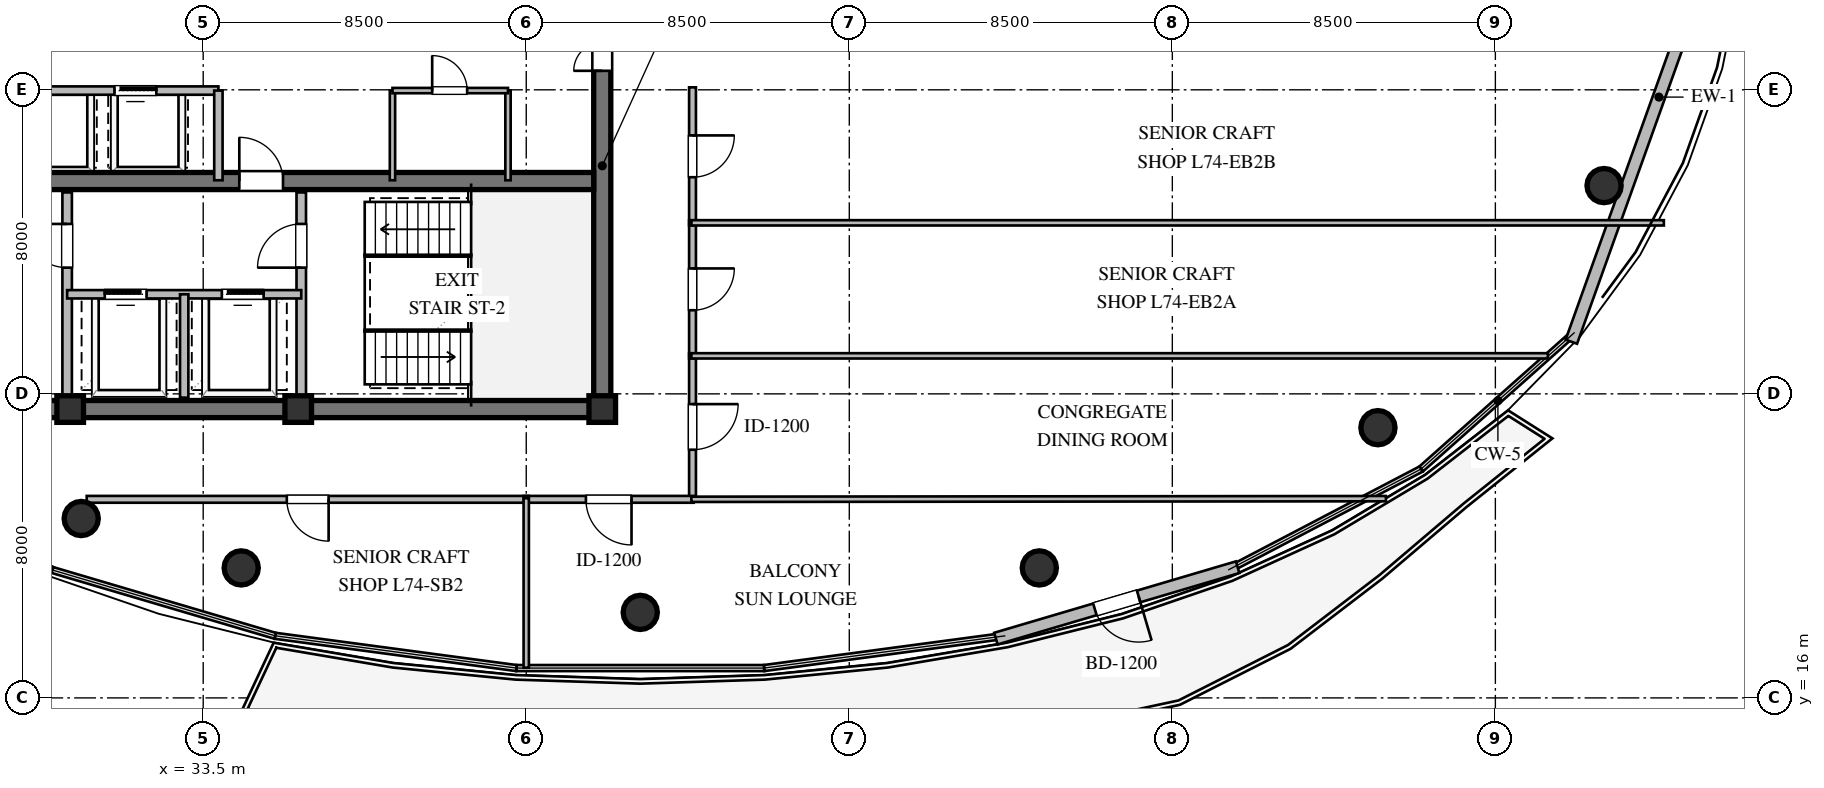
"""IFC4 building model, lengths in metres.
Left out: names, types, materials, properties, quantities, classifications, styles, units other than length and angle.
Written with IfcOpenShell. Run it as: python <this file> out.ifc"""

import sys

from ifc_helpers import new_model, si_unit, direction, frame, frame_2d, origin, origin_2d, place, context, subcontext, project, spatial, rectangle, circle, extrude, element, fill, save


model = new_model("IFC4")
c1 = context("Model", 3, precision=1e-05, world=origin(), true_north=direction((0.0, 1.0)))
c2 = subcontext(c1, "Body", "Model", "MODEL_VIEW")
j1 = project(units=[si_unit("LENGTHUNIT", "METRE"), si_unit("PLANEANGLEUNIT", "RADIAN")], contexts=[c1])
p1 = place(None, origin())
s1 = spatial("IfcSite", under=j1, at=p1, CompositionType="ELEMENT")
p2 = place(p1, origin())
s2 = spatial("IfcBuilding", under=s1, at=p2, CompositionType="ELEMENT")
p3 = place(p2, frame((0.0, 0.0, 281.4)))
s3 = spatial("IfcBuildingStorey", under=s2, at=p3, CompositionType="ELEMENT", Elevation=281.4)
p4 = place(p3, frame((21.775, 23.6, 0.0), z_axis=(0.0, 0.0, 1.0), x_axis=(1.0, 0.0, 0.0)))
e1 = element("IfcWall", 1, at=p4, inside=s3, PredefinedType="SHEAR", context=c2, shape_type="SweptSolid", body=[
    extrude(rectangle(XDim=22.45, YDim=0.45, at=frame_2d((11.225, 0.0))), origin(), (0.0, 0.0, 1.0), 3.56),
])
p5 = place(p3, frame((44.0, 23.825, 0.0), z_axis=(0.0, 0.0, 1.0), x_axis=(0.0, 1.0, 0.0)))
e2 = element("IfcWall", 2, at=p5, inside=s3, PredefinedType="SHEAR", context=c2, shape_type="SweptSolid", body=[
    extrude(rectangle(XDim=12.35, YDim=0.45, at=frame_2d((6.175, 0.0))), origin(), (0.0, 0.0, 1.0), 3.56),
])
p6 = place(p5, frame((8.675, 0.0, 0.0)))
e3 = element("IfcOpeningElement", 3, at=p6, cuts=e2, PredefinedType="OPENING", context=c2, shape_type="SweptSolid", body=[
    extrude(rectangle(XDim=1.5, YDim=2.15, at=frame_2d((0.75, 1.075))), frame((0.0, 0.235, 0.0), z_axis=(0.0, -1.0, 0.0), x_axis=(1.0, 0.0, 0.0)), (0.0, 0.0, 1.0), 0.47),
])
p7 = place(p3, frame((22.225, 29.6, 0.0), z_axis=(0.0, 0.0, 1.0), x_axis=(1.0, 0.0, 0.0)))
e4 = element("IfcWall", 4, at=p7, inside=s3, PredefinedType="SHEAR", context=c2, shape_type="SweptSolid", body=[
    extrude(rectangle(XDim=21.55, YDim=0.45, at=frame_2d((10.775, 0.0))), origin(), (0.0, 0.0, 1.0), 3.56),
])
p8 = place(p7, frame((12.225, 0.0, 0.0)))
e5 = element("IfcOpeningElement", 5, at=p8, cuts=e4, PredefinedType="OPENING", context=c2, shape_type="SweptSolid", body=[
    extrude(rectangle(XDim=1.15, YDim=2.1, at=frame_2d((0.575, 1.05))), frame((0.0, 0.235, 0.0), z_axis=(0.0, -1.0, 0.0), x_axis=(1.0, 0.0, 0.0)), (0.0, 0.0, 1.0), 0.47),
])
for number, where, z_axis, x_axis in (
    (6, (30.0, 23.6, 0.0), (0.0, 0.0, 1.0), (1.0, 0.0, 0.0)),
    (7, (36.0, 23.6, 0.0), (0.0, 0.0, 1.0), (1.0, 0.0, 0.0)),
    (8, (44.0, 23.6, 0.0), (0.0, 0.0, 1.0), (1.0, 0.0, 0.0)),
):
    element("IfcColumn", number, at=place(p3, frame(where, z_axis=z_axis, x_axis=x_axis)), inside=s3, PredefinedType="COLUMN", context=c2, shape_type="SweptSolid", body=[
        extrude(rectangle(XDim=0.7, YDim=0.7, at=origin_2d()), origin(), (0.0, 0.0, 1.0), 3.8),
    ])
for number, where, z_axis, x_axis in (
    (9, (30.29, 20.72, 0.0), (0.0, 0.0, 1.0), (1.0, 0.0, 0.0)),
    (10, (34.5, 19.42, 0.0), (0.0, 0.0, 1.0), (1.0, 0.0, 0.0)),
    (11, (45.0, 18.25, 0.0), (0.0, 0.0, 1.0), (1.0, 0.0, 0.0)),
    (12, (55.5, 19.42, 0.0), (0.0, 0.0, 1.0), (1.0, 0.0, 0.0)),
    (13, (64.41, 23.11, 0.0), (0.0, 0.0, 1.0), (1.0, 0.0, 0.0)),
    (14, (70.36, 29.48, 0.0), (0.0, 0.0, 1.0), (1.0, 0.0, 0.0)),
):
    element("IfcColumn", number, at=place(p3, frame(where, z_axis=z_axis, x_axis=x_axis)), inside=s3, PredefinedType="COLUMN", context=c2, shape_type="SweptSolid", body=[
        extrude(circle(Radius=0.45, at=origin_2d()), origin(), (0.0, 0.0, 1.0), 3.8),
    ])
p9 = place(p3, frame((74.108, 38.245, 0.0), z_axis=(0.0, 0.0, 1.0), x_axis=(-0.337073777429, -0.941478235845, 0.0)))
e15 = element("IfcWall", 15, at=p9, inside=s3, PredefinedType="STANDARD", context=c2, shape_type="SweptSolid", body=[
    extrude(rectangle(XDim=13.673, YDim=0.32, at=frame_2d((6.837, 0.0))), origin(), (0.0, 0.0, 1.0), 3.56),
])
p10 = place(p3, frame((60.718, 19.439, 0.0), z_axis=(0.0, 0.0, 1.0), x_axis=(-0.959026574291, -0.283316130503, 0.0)))
e16 = element("IfcWall", 16, at=p10, inside=s3, PredefinedType="STANDARD", context=c2, shape_type="SweptSolid", body=[
    extrude(rectangle(XDim=6.632, YDim=0.32, at=frame_2d((3.316, 0.0))), origin(), (0.0, 0.0, 1.0), 3.56),
])
p11 = place(p10, frame((2.716, 0.0, 0.0)))
e17 = element("IfcOpeningElement", 17, at=p11, cuts=e16, PredefinedType="OPENING", context=c2, shape_type="SweptSolid", body=[
    extrude(rectangle(XDim=1.2, YDim=2.15, at=frame_2d((0.6, 1.075))), frame((0.0, 0.17, 0.0), z_axis=(0.0, -1.0, 0.0), x_axis=(1.0, 0.0, 0.0)), (0.0, 0.0, 1.0), 0.34),
])
p12 = place(p3, frame((29.92, 23.9, 0.0), z_axis=(0.0, 0.0, 1.0), x_axis=(0.0, 1.0, 0.0)))
e18 = element("IfcWall", 18, at=p12, inside=s3, PredefinedType="SOLIDWALL", context=c2, shape_type="SweptSolid", body=[
    extrude(rectangle(XDim=5.4, YDim=0.25, at=frame_2d((2.7, 0.0))), origin(), (0.0, 0.0, 1.0), 3.006),
])
p13 = place(p12, frame((3.421, 0.0, 0.0)))
e19 = element("IfcOpeningElement", 19, at=p13, cuts=e18, PredefinedType="OPENING", context=c2, shape_type="SweptSolid", body=[
    extrude(rectangle(XDim=1.15, YDim=2.1, at=frame_2d((0.575, 1.05))), frame((0.0, 0.135, 0.0), z_axis=(0.0, -1.0, 0.0), x_axis=(1.0, 0.0, 0.0)), (0.0, 0.0, 1.0), 0.27),
])
p14 = place(p3, frame((36.08, 23.9, 0.0), z_axis=(0.0, 0.0, 1.0), x_axis=(0.0, 1.0, 0.0)))
e20 = element("IfcWall", 20, at=p14, inside=s3, PredefinedType="SOLIDWALL", context=c2, shape_type="SweptSolid", body=[
    extrude(rectangle(XDim=5.4, YDim=0.25, at=frame_2d((2.7, 0.0))), origin(), (0.0, 0.0, 1.0), 3.56),
])
p15 = place(p14, frame((3.421, 0.0, 0.0)))
e21 = element("IfcOpeningElement", 21, at=p15, cuts=e20, PredefinedType="OPENING", context=c2, shape_type="SweptSolid", body=[
    extrude(rectangle(XDim=1.15, YDim=2.1, at=frame_2d((0.575, 1.05))), frame((0.0, 0.135, 0.0), z_axis=(0.0, -1.0, 0.0), x_axis=(1.0, 0.0, 0.0)), (0.0, 0.0, 1.0), 0.27),
])
p16 = place(p3, frame((29.92, 26.62, 0.0), z_axis=(0.0, 0.0, 1.0), x_axis=(1.0, 0.0, 0.0)))
e22 = element("IfcWall", 22, at=p16, inside=s3, PredefinedType="SOLIDWALL", context=c2, shape_type="SweptSolid", body=[
    extrude(rectangle(XDim=6.16, YDim=0.22, at=frame_2d((3.08, 0.0))), origin(), (0.0, 0.0, 1.0), 3.56),
])
p17 = place(p16, frame((0.99, 0.0, 0.0)))
e23 = element("IfcOpeningElement", 23, at=p17, cuts=e22, PredefinedType="OPENING", context=c2, shape_type="SweptSolid", body=[
    extrude(rectangle(XDim=1.1, YDim=2.1, at=frame_2d((0.55, 1.05))), frame((0.0, 0.12, 0.0), z_axis=(0.0, -1.0, 0.0), x_axis=(1.0, 0.0, 0.0)), (0.0, 0.0, 1.0), 0.24),
])
p18 = place(p16, frame((4.07, 0.0, 0.0)))
e24 = element("IfcOpeningElement", 24, at=p18, cuts=e22, PredefinedType="OPENING", context=c2, shape_type="SweptSolid", body=[
    extrude(rectangle(XDim=1.1, YDim=2.1, at=frame_2d((0.55, 1.05))), frame((0.0, 0.12, 0.0), z_axis=(0.0, -1.0, 0.0), x_axis=(1.0, 0.0, 0.0)), (0.0, 0.0, 1.0), 0.24),
])
p19 = place(p3, frame((33.0, 23.9, 0.0), z_axis=(0.0, 0.0, 1.0), x_axis=(0.0, 1.0, 0.0)))
e25 = element("IfcWall", 25, at=p19, inside=s3, PredefinedType="SOLIDWALL", context=c2, shape_type="SweptSolid", body=[
    extrude(rectangle(XDim=2.72, YDim=0.22, at=frame_2d((1.36, 0.0))), origin(), (0.0, 0.0, 1.0), 3.56),
])
p20 = place(p3, frame((26.1, 31.98, 0.0), z_axis=(0.0, 0.0, 1.0), x_axis=(1.0, 0.0, 0.0)))
e26 = element("IfcWall", 26, at=p20, inside=s3, PredefinedType="SOLIDWALL", context=c2, shape_type="SweptSolid", body=[
    extrude(rectangle(XDim=7.8, YDim=0.22, at=frame_2d((3.9, 0.0))), origin(), (0.0, 0.0, 1.0), 3.56),
])
p21 = place(p20, frame((1.4, 0.0, 0.0)))
e27 = element("IfcOpeningElement", 27, at=p21, cuts=e26, PredefinedType="OPENING", context=c2, shape_type="SweptSolid", body=[
    extrude(rectangle(XDim=1.1, YDim=2.1, at=frame_2d((0.55, 1.05))), frame((0.0, 0.12, 0.0), z_axis=(0.0, -1.0, 0.0), x_axis=(1.0, 0.0, 0.0)), (0.0, 0.0, 1.0), 0.24),
])
p22 = place(p20, frame((5.066, 0.0, 0.0)))
e28 = element("IfcOpeningElement", 28, at=p22, cuts=e26, PredefinedType="OPENING", context=c2, shape_type="SweptSolid", body=[
    extrude(rectangle(XDim=1.1, YDim=2.1, at=frame_2d((0.55, 1.05))), frame((0.0, 0.12, 0.0), z_axis=(0.0, -1.0, 0.0), x_axis=(1.0, 0.0, 0.0)), (0.0, 0.0, 1.0), 0.24),
])
p23 = place(p3, frame((33.9, 29.62, 0.0), z_axis=(0.0, 0.0, 1.0), x_axis=(0.0, 1.0, 0.0)))
e29 = element("IfcWall", 29, at=p23, inside=s3, PredefinedType="SOLIDWALL", context=c2, shape_type="SweptSolid", body=[
    extrude(rectangle(XDim=2.36, YDim=0.22, at=frame_2d((1.18, 0.0))), origin(), (0.0, 0.0, 1.0), 3.56),
])
for number, where, z_axis, x_axis in (
    (30, (38.48, 29.62, 0.0), (0.0, 0.0, 1.0), (0.0, 1.0, 0.0)),
    (31, (41.52, 29.62, 0.0), (0.0, 0.0, 1.0), (0.0, 1.0, 0.0)),
):
    element("IfcWall", number, at=place(p3, frame(where, z_axis=z_axis, x_axis=x_axis)), inside=s3, PredefinedType="PARTITIONING", context=c2, shape_type="SweptSolid", body=[
        extrude(rectangle(XDim=2.36, YDim=0.14, at=frame_2d((1.18, 0.0))), origin(), (0.0, 0.0, 1.0), 3.56),
    ])
p24 = place(p3, frame((38.48, 31.98, 0.0), z_axis=(0.0, 0.0, 1.0), x_axis=(1.0, 0.0, 0.0)))
e32 = element("IfcWall", 32, at=p24, inside=s3, PredefinedType="PARTITIONING", context=c2, shape_type="SweptSolid", body=[
    extrude(rectangle(XDim=3.04, YDim=0.14, at=frame_2d((1.52, 0.0))), origin(), (0.0, 0.0, 1.0), 3.56),
])
p25 = place(p24, frame((1.045, 0.0, 0.0)))
e33 = element("IfcOpeningElement", 33, at=p25, cuts=e32, PredefinedType="OPENING", context=c2, shape_type="SweptSolid", body=[
    extrude(rectangle(XDim=0.92, YDim=2.1, at=frame_2d((0.46, 1.05))), frame((0.0, 0.08, 0.0), z_axis=(0.0, -1.0, 0.0), x_axis=(1.0, 0.0, 0.0)), (0.0, 0.0, 1.0), 0.16),
])
p26 = place(p3, frame((46.375, 25.065, 0.0), z_axis=(0.0, 0.0, 1.0), x_axis=(0.0, -1.0, 0.0)))
e34 = element("IfcWall", 34, at=p26, inside=s3, PredefinedType="PARTITIONING", context=c2, shape_type="SweptSolid", body=[
    extrude(rectangle(XDim=3.87, YDim=0.18, at=frame_2d((1.935, 0.0))), origin(), (0.0, 0.0, 1.0), 3.56),
])
p27 = place(p26, frame((1.335, 0.0, 0.0)))
e35 = element("IfcOpeningElement", 35, at=p27, cuts=e34, PredefinedType="OPENING", context=c2, shape_type="SweptSolid", body=[
    extrude(rectangle(XDim=1.2, YDim=2.15, at=frame_2d((0.6, 1.075))), frame((0.0, 0.1, 0.0), z_axis=(0.0, -1.0, 0.0), x_axis=(1.0, 0.0, 0.0)), (0.0, 0.0, 1.0), 0.2),
])
p28 = place(p3, frame((46.375, 28.565, 0.0), z_axis=(0.0, 0.0, 1.0), x_axis=(0.0, -1.0, 0.0)))
e36 = element("IfcWall", 36, at=p28, inside=s3, PredefinedType="PARTITIONING", context=c2, shape_type="SweptSolid", body=[
    extrude(rectangle(XDim=3.63, YDim=0.18, at=frame_2d((1.815, 0.0))), origin(), (0.0, 0.0, 1.0), 3.56),
])
p29 = place(p28, frame((1.265, 0.0, 0.0)))
e37 = element("IfcOpeningElement", 37, at=p29, cuts=e36, PredefinedType="OPENING", context=c2, shape_type="SweptSolid", body=[
    extrude(rectangle(XDim=1.1, YDim=2.1, at=frame_2d((0.55, 1.05))), frame((0.0, 0.1, 0.0), z_axis=(0.0, -1.0, 0.0), x_axis=(1.0, 0.0, 0.0)), (0.0, 0.0, 1.0), 0.2),
])
p30 = place(p3, frame((46.375, 32.065, 0.0), z_axis=(0.0, 0.0, 1.0), x_axis=(0.0, -1.0, 0.0)))
e38 = element("IfcWall", 38, at=p30, inside=s3, PredefinedType="PARTITIONING", context=c2, shape_type="SweptSolid", body=[
    extrude(rectangle(XDim=3.63, YDim=0.18, at=frame_2d((1.815, 0.0))), origin(), (0.0, 0.0, 1.0), 3.56),
])
p31 = place(p30, frame((1.265, 0.0, 0.0)))
e39 = element("IfcOpeningElement", 39, at=p31, cuts=e38, PredefinedType="OPENING", context=c2, shape_type="SweptSolid", body=[
    extrude(rectangle(XDim=1.1, YDim=2.1, at=frame_2d((0.55, 1.05))), frame((0.0, 0.1, 0.0), z_axis=(0.0, -1.0, 0.0), x_axis=(1.0, 0.0, 0.0)), (0.0, 0.0, 1.0), 0.2),
])
p32 = place(p3, frame((42.065, 21.225, 0.0), z_axis=(0.0, 0.0, 1.0), x_axis=(-1.0, 0.0, 0.0)))
e40 = element("IfcWall", 40, at=p32, inside=s3, PredefinedType="PARTITIONING", context=c2, shape_type="SweptSolid", body=[
    extrude(rectangle(XDim=11.63, YDim=0.18, at=frame_2d((5.815, 0.0))), origin(), (0.0, 0.0, 1.0), 3.017),
])
p33 = place(p32, frame((5.265, 0.0, 0.0)))
e41 = element("IfcOpeningElement", 41, at=p33, cuts=e40, PredefinedType="OPENING", context=c2, shape_type="SweptSolid", body=[
    extrude(rectangle(XDim=1.1, YDim=2.1, at=frame_2d((0.55, 1.05))), frame((0.0, 0.1, 0.0), z_axis=(0.0, -1.0, 0.0), x_axis=(1.0, 0.0, 0.0)), (0.0, 0.0, 1.0), 0.2),
])
p34 = place(p3, frame((46.405, 21.225, 0.0), z_axis=(0.0, 0.0, 1.0), x_axis=(-1.0, 0.0, 0.0)))
e42 = element("IfcWall", 42, at=p34, inside=s3, PredefinedType="PARTITIONING", context=c2, shape_type="SweptSolid", body=[
    extrude(rectangle(XDim=4.47, YDim=0.18, at=frame_2d((2.235, 0.0))), origin(), (0.0, 0.0, 1.0), 3.196),
])
p35 = place(p34, frame((1.635, 0.0, 0.0)))
e43 = element("IfcOpeningElement", 43, at=p35, cuts=e42, PredefinedType="OPENING", context=c2, shape_type="SweptSolid", body=[
    extrude(rectangle(XDim=1.2, YDim=2.15, at=frame_2d((0.6, 1.075))), frame((0.0, 0.1, 0.0), z_axis=(0.0, -1.0, 0.0), x_axis=(1.0, 0.0, 0.0)), (0.0, 0.0, 1.0), 0.2),
])
p36 = place(p3, frame((46.345, 25.0, 0.0), z_axis=(0.0, 0.0, 1.0), x_axis=(1.0, 0.0, 0.0)))
e44 = element("IfcWall", 44, at=p36, inside=s3, PredefinedType="PARTITIONING", context=c2, shape_type="SweptSolid", body=[
    extrude(rectangle(XDim=22.539, YDim=0.14, at=frame_2d((11.269, 0.0))), origin(), (0.0, 0.0, 1.0), 3.006),
])
p37 = place(p3, frame((64.621, 21.243, 0.0), z_axis=(0.0, 0.0, 1.0), x_axis=(-0.999999524525, -0.000975166183, 0.0)))
e45 = element("IfcWall", 45, at=p37, inside=s3, PredefinedType="PARTITIONING", context=c2, shape_type="SweptSolid", body=[
    extrude(rectangle(XDim=18.276, YDim=0.14, at=frame_2d((9.138, 0.0))), origin(), (0.0, 0.0, 1.0), 3.196),
])
p38 = place(p3, frame((46.345, 28.5, 0.0), z_axis=(0.0, 0.0, 1.0), x_axis=(1.0, 0.0, 0.0)))
e46 = element("IfcWall", 46, at=p38, inside=s3, PredefinedType="PARTITIONING", context=c2, shape_type="SweptSolid", body=[
    extrude(rectangle(XDim=25.588, YDim=0.14, at=frame_2d((12.794, 0.0))), origin(), (0.0, 0.0, 1.0), 3.006),
])
p39 = place(p3, frame((42.0, 21.255, 0.0), z_axis=(0.0, 0.0, 1.0), x_axis=(0.0, -1.0, 0.0)))
e47 = element("IfcWall", 47, at=p39, inside=s3, PredefinedType="PARTITIONING", context=c2, shape_type="SweptSolid", body=[
    extrude(rectangle(XDim=4.46, YDim=0.14, at=frame_2d((2.23, 0.0))), origin(), (0.0, 0.0, 1.0), 3.56),
])
p40 = place(p11, origin())
e48 = element("IfcDoor", 48, at=p40, inside=s3, OperationType="SINGLE_SWING_LEFT", PredefinedType="DOOR", context=c2, shape_type="SweptSolid", body=[
    extrude(rectangle(XDim=1.2, YDim=2.15, at=frame_2d((0.6, 1.075))), frame((0.0, 0.025, 0.0), z_axis=(0.0, -1.0, 0.0), x_axis=(1.0, 0.0, 0.0)), (0.0, 0.0, 1.0), 0.05),
])
fill(e17, e48)
p41 = place(p13, origin())
e49 = element("IfcDoor", 49, at=p41, inside=s3, OperationType="SINGLE_SWING_RIGHT", PredefinedType="DOOR", context=c2, shape_type="SweptSolid", body=[
    extrude(rectangle(XDim=1.15, YDim=2.1, at=frame_2d((0.575, 1.05))), frame((0.0, 0.025, 0.0), z_axis=(0.0, -1.0, 0.0), x_axis=(1.0, 0.0, 0.0)), (0.0, 0.0, 1.0), 0.05),
])
fill(e19, e49)
p42 = place(p15, origin())
e50 = element("IfcDoor", 50, at=p42, inside=s3, OperationType="SINGLE_SWING_LEFT", PredefinedType="DOOR", context=c2, shape_type="SweptSolid", body=[
    extrude(rectangle(XDim=1.15, YDim=2.1, at=frame_2d((0.575, 1.05))), frame((0.0, 0.025, 0.0), z_axis=(0.0, -1.0, 0.0), x_axis=(1.0, 0.0, 0.0)), (0.0, 0.0, 1.0), 0.05),
])
fill(e21, e50)
p43 = place(p17, origin())
e51 = element("IfcDoor", 51, at=p43, inside=s3, OperationType="SLIDING_TO_LEFT", PredefinedType="DOOR", context=c2, shape_type="SweptSolid", body=[
    extrude(rectangle(XDim=1.1, YDim=2.1, at=frame_2d((0.55, 1.05))), frame((0.0, 0.025, 0.0), z_axis=(0.0, -1.0, 0.0), x_axis=(1.0, 0.0, 0.0)), (0.0, 0.0, 1.0), 0.05),
])
fill(e23, e51)
p44 = place(p18, origin())
e52 = element("IfcDoor", 52, at=p44, inside=s3, OperationType="SLIDING_TO_RIGHT", PredefinedType="DOOR", context=c2, shape_type="SweptSolid", body=[
    extrude(rectangle(XDim=1.1, YDim=2.1, at=frame_2d((0.55, 1.05))), frame((0.0, 0.025, 0.0), z_axis=(0.0, -1.0, 0.0), x_axis=(1.0, 0.0, 0.0)), (0.0, 0.0, 1.0), 0.05),
])
fill(e24, e52)
p45 = place(p8, origin())
e53 = element("IfcDoor", 53, at=p45, inside=s3, OperationType="SINGLE_SWING_LEFT", PredefinedType="DOOR", context=c2, shape_type="SweptSolid", body=[
    extrude(rectangle(XDim=1.15, YDim=2.1, at=frame_2d((0.575, 1.05))), frame((0.0, 0.025, 0.0), z_axis=(0.0, -1.0, 0.0), x_axis=(1.0, 0.0, 0.0)), (0.0, 0.0, 1.0), 0.05),
])
fill(e5, e53)
p46 = place(p6, origin())
e54 = element("IfcDoor", 54, at=p46, inside=s3, OperationType="DOUBLE_DOOR_SINGLE_SWING", PredefinedType="DOOR", context=c2, shape_type="SweptSolid", body=[
    extrude(rectangle(XDim=1.5, YDim=2.15, at=frame_2d((0.75, 1.075))), frame((0.0, 0.025, 0.0), z_axis=(0.0, -1.0, 0.0), x_axis=(1.0, 0.0, 0.0)), (0.0, 0.0, 1.0), 0.05),
])
fill(e3, e54)
p47 = place(p22, origin())
e55 = element("IfcDoor", 55, at=p47, inside=s3, OperationType="SLIDING_TO_RIGHT", PredefinedType="DOOR", context=c2, shape_type="SweptSolid", body=[
    extrude(rectangle(XDim=1.1, YDim=2.1, at=frame_2d((0.55, 1.05))), frame((0.0, 0.025, 0.0), z_axis=(0.0, -1.0, 0.0), x_axis=(1.0, 0.0, 0.0)), (0.0, 0.0, 1.0), 0.05),
])
fill(e28, e55)
p48 = place(p25, origin())
e56 = element("IfcDoor", 56, at=p48, inside=s3, OperationType="SINGLE_SWING_LEFT", PredefinedType="DOOR", context=c2, shape_type="SweptSolid", body=[
    extrude(rectangle(XDim=0.92, YDim=2.1, at=frame_2d((0.46, 1.05))), frame((0.0, 0.025, 0.0), z_axis=(0.0, -1.0, 0.0), x_axis=(1.0, 0.0, 0.0)), (0.0, 0.0, 1.0), 0.05),
])
fill(e33, e56)
p49 = place(p27, origin())
e57 = element("IfcDoor", 57, at=p49, inside=s3, OperationType="SINGLE_SWING_LEFT", PredefinedType="DOOR", context=c2, shape_type="SweptSolid", body=[
    extrude(rectangle(XDim=1.2, YDim=2.15, at=frame_2d((0.6, 1.075))), frame((0.0, 0.025, 0.0), z_axis=(0.0, -1.0, 0.0), x_axis=(1.0, 0.0, 0.0)), (0.0, 0.0, 1.0), 0.05),
])
fill(e35, e57)
p50 = place(p29, origin())
e58 = element("IfcDoor", 58, at=p50, inside=s3, OperationType="SINGLE_SWING_LEFT", PredefinedType="DOOR", context=c2, shape_type="SweptSolid", body=[
    extrude(rectangle(XDim=1.1, YDim=2.1, at=frame_2d((0.55, 1.05))), frame((0.0, 0.025, 0.0), z_axis=(0.0, -1.0, 0.0), x_axis=(1.0, 0.0, 0.0)), (0.0, 0.0, 1.0), 0.05),
])
fill(e37, e58)
p51 = place(p31, origin())
e59 = element("IfcDoor", 59, at=p51, inside=s3, OperationType="SINGLE_SWING_LEFT", PredefinedType="DOOR", context=c2, shape_type="SweptSolid", body=[
    extrude(rectangle(XDim=1.1, YDim=2.1, at=frame_2d((0.55, 1.05))), frame((0.0, 0.025, 0.0), z_axis=(0.0, -1.0, 0.0), x_axis=(1.0, 0.0, 0.0)), (0.0, 0.0, 1.0), 0.05),
])
fill(e39, e59)
p52 = place(p33, origin())
e60 = element("IfcDoor", 60, at=p52, inside=s3, OperationType="SINGLE_SWING_LEFT", PredefinedType="DOOR", context=c2, shape_type="SweptSolid", body=[
    extrude(rectangle(XDim=1.1, YDim=2.1, at=frame_2d((0.55, 1.05))), frame((0.0, 0.025, 0.0), z_axis=(0.0, -1.0, 0.0), x_axis=(1.0, 0.0, 0.0)), (0.0, 0.0, 1.0), 0.05),
])
fill(e41, e60)
p53 = place(p35, origin())
e61 = element("IfcDoor", 61, at=p53, inside=s3, OperationType="SINGLE_SWING_LEFT", PredefinedType="DOOR", context=c2, shape_type="SweptSolid", body=[
    extrude(rectangle(XDim=1.2, YDim=2.15, at=frame_2d((0.6, 1.075))), frame((0.0, 0.025, 0.0), z_axis=(0.0, -1.0, 0.0), x_axis=(1.0, 0.0, 0.0)), (0.0, 0.0, 1.0), 0.05),
])
fill(e43, e61)
save(model, sys.argv[1])
